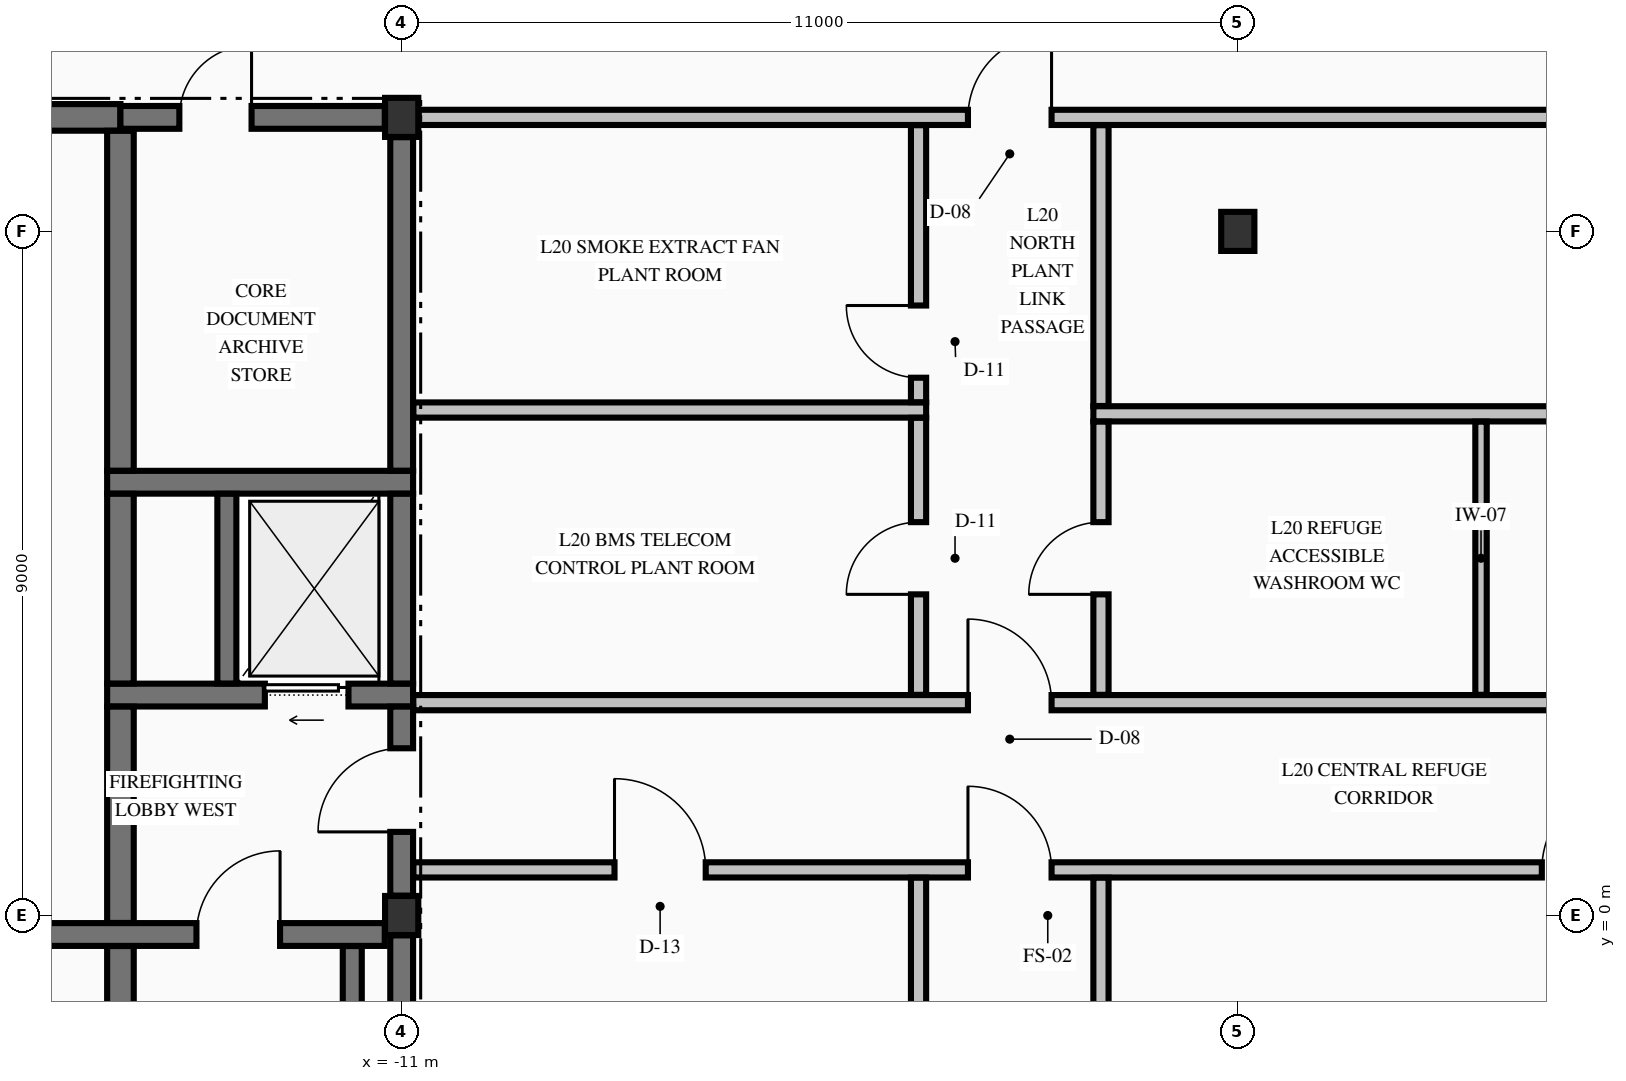
"""IFC4 building model, lengths in metres.
Left out: names, types, materials, properties, quantities, classifications, styles, units other than length and angle.
Written with IfcOpenShell. Run it as: python <this file> out.ifc"""

import sys

from ifc_helpers import new_model, si_unit, direction, frame, frame_2d, origin, origin_2d, place, context, subcontext, project, spatial, rectangle, i_section, extrude, element, fill, save


model = new_model("IFC4")
c1 = context("Model", 3, precision=1e-05, world=origin(), true_north=direction((0.0, 1.0)))
c2 = subcontext(c1, "Body", "Model", "MODEL_VIEW")
j1 = project(units=[si_unit("LENGTHUNIT", "METRE"), si_unit("PLANEANGLEUNIT", "RADIAN")], contexts=[c1])
p1 = place(None, origin())
s1 = spatial("IfcSite", under=j1, at=p1, CompositionType="ELEMENT")
p2 = place(p1, origin())
s2 = spatial("IfcBuilding", under=s1, at=p2, CompositionType="ELEMENT")
p3 = place(p2, frame((0.0, 0.0, 82.18)))
s3 = spatial("IfcBuildingStorey", under=s2, at=p3, CompositionType="ELEMENT", Elevation=82.18)
for number, where, z_axis, x_axis in (
    (1, (-11.0, 0.0, -0.425), (0.0, 0.0, 1.0), (1.0, 0.0, 0.0)),
    (2, (-11.0, 10.5, -0.425), (0.0, 0.0, 1.0), (1.0, 0.0, 0.0)),
    (3, (0.0, 9.0, -0.425), (0.0, 0.0, 1.0), (1.0, 0.0, 0.0)),
):
    element("IfcColumn", number, at=place(p3, frame(where, z_axis=z_axis, x_axis=x_axis)), inside=s3, PredefinedType="COLUMN", context=c2, shape_type="SweptSolid", body=[
        extrude(i_section(OverallWidth=0.437, OverallDepth=0.514, WebThickness=0.061, FlangeThickness=0.097, FilletRadius=0.015, at=origin_2d()), origin(), (0.0, 0.0, 1.0), 4.76),
    ])
p4 = place(p3, frame((-19.778, -0.25, 0.0), z_axis=(0.0, 0.0, 1.0), x_axis=(1.0, 0.0, 0.0)))
e4 = element("IfcWall", 4, at=p4, inside=s3, PredefinedType="SHEAR", context=c2, shape_type="SweptSolid", body=[
    extrude(rectangle(XDim=8.555, YDim=0.3, at=frame_2d((4.278, 0.0))), origin(), (0.0, 0.0, 1.0), 4.335),
])
p5 = place(p4, frame((6.077, 0.0, 0.0)))
e5 = element("IfcOpeningElement", 5, at=p5, cuts=e4, PredefinedType="OPENING", context=c2, shape_type="SweptSolid", body=[
    extrude(rectangle(XDim=1.1, YDim=2.15, at=frame_2d((0.55, 1.075))), frame((0.0, 0.16, 0.0), z_axis=(0.0, -1.0, 0.0), x_axis=(1.0, 0.0, 0.0)), (0.0, 0.0, 1.0), 0.32),
])
p6 = place(p3, frame((-14.875, 2.9, 0.0), z_axis=(0.0, 0.0, 1.0), x_axis=(1.0, 0.0, 0.0)))
e6 = element("IfcWall", 6, at=p6, inside=s3, PredefinedType="SHEAR", context=c2, shape_type="SweptSolid", body=[
    extrude(rectangle(XDim=4.025, YDim=0.3, at=frame_2d((2.012, 0.0))), origin(), (0.0, 0.0, 1.0), 4.335),
])
p7 = place(p6, frame((2.075, 0.0, 0.0)))
e7 = element("IfcOpeningElement", 7, at=p7, cuts=e6, PredefinedType="OPENING", context=c2, shape_type="SweptSolid", body=[
    extrude(rectangle(XDim=1.1, YDim=2.2, at=frame_2d((0.55, 1.1))), frame((0.0, 0.16, 0.0), z_axis=(0.0, -1.0, 0.0), x_axis=(1.0, 0.0, 0.0)), (0.0, 0.0, 1.0), 0.32),
])
p8 = place(p3, frame((-14.875, 5.7, 0.0), z_axis=(0.0, 0.0, 1.0), x_axis=(1.0, 0.0, 0.0)))
e8 = element("IfcWall", 8, at=p8, inside=s3, PredefinedType="SHEAR", context=c2, shape_type="SweptSolid", body=[
    extrude(rectangle(XDim=4.025, YDim=0.3, at=frame_2d((2.012, 0.0))), origin(), (0.0, 0.0, 1.0), 4.335),
])
p9 = place(p3, frame((-19.778, 10.5, 0.0), z_axis=(0.0, 0.0, 1.0), x_axis=(1.0, 0.0, 0.0)))
e9 = element("IfcWall", 9, at=p9, inside=s3, PredefinedType="SHEAR", context=c2, shape_type="SweptSolid", body=[
    extrude(rectangle(XDim=5.078, YDim=0.35, at=frame_2d((2.539, 0.0))), origin(), (0.0, 0.0, 1.0), 4.335),
])
p10 = place(p9, frame((1.903, 0.0, 0.0)))
e10 = element("IfcOpeningElement", 10, at=p10, cuts=e9, PredefinedType="OPENING", context=c2, shape_type="SweptSolid", body=[
    extrude(rectangle(XDim=0.95, YDim=2.02, at=frame_2d((0.475, 1.01))), frame((0.0, 0.185, 0.0), z_axis=(0.0, -1.0, 0.0), x_axis=(1.0, 0.0, 0.0)), (0.0, 0.0, 1.0), 0.37),
])
p11 = place(p3, frame((-14.7, 10.5, 0.0), z_axis=(0.0, 0.0, 1.0), x_axis=(1.0, 0.0, 0.0)))
e11 = element("IfcWall", 11, at=p11, inside=s3, PredefinedType="SHEAR", context=c2, shape_type="SweptSolid", body=[
    extrude(rectangle(XDim=3.478, YDim=0.3, at=frame_2d((1.739, 0.0))), origin(), (0.0, 0.0, 1.0), 4.335),
])
p12 = place(p11, frame((0.775, 0.0, 0.0)))
e12 = element("IfcOpeningElement", 12, at=p12, cuts=e11, PredefinedType="OPENING", context=c2, shape_type="SweptSolid", body=[
    extrude(rectangle(XDim=0.95, YDim=2.02, at=frame_2d((0.475, 1.01))), frame((0.0, 0.16, 0.0), z_axis=(0.0, -1.0, 0.0), x_axis=(1.0, 0.0, 0.0)), (0.0, 0.0, 1.0), 0.32),
])
p13 = place(p3, frame((-10.847, 0.6, 0.0), z_axis=(0.0, 0.0, 1.0), x_axis=(1.0, 0.0, 0.0)))
e13 = element("IfcWall", 13, at=p13, inside=s3, PredefinedType="PARTITIONING", context=c2, shape_type="SweptSolid", body=[
    extrude(rectangle(XDim=21.694, YDim=0.2, at=frame_2d((10.847, 0.0))), origin(), (0.0, 0.0, 1.0), 4.335),
])
p14 = place(p13, frame((7.297, 0.0, 0.0)))
e14 = element("IfcOpeningElement", 14, at=p14, cuts=e13, PredefinedType="OPENING", context=c2, shape_type="SweptSolid", body=[
    extrude(rectangle(XDim=1.1, YDim=2.15, at=frame_2d((0.55, 1.075))), frame((0.0, 0.11, 0.0), z_axis=(0.0, -1.0, 0.0), x_axis=(1.0, 0.0, 0.0)), (0.0, 0.0, 1.0), 0.22),
])
p15 = place(p13, frame((2.647, 0.0, 0.0)))
e15 = element("IfcOpeningElement", 15, at=p15, cuts=e13, PredefinedType="OPENING", context=c2, shape_type="SweptSolid", body=[
    extrude(rectangle(XDim=1.2, YDim=2.15, at=frame_2d((0.6, 1.075))), frame((0.0, 0.11, 0.0), z_axis=(0.0, -1.0, 0.0), x_axis=(1.0, 0.0, 0.0)), (0.0, 0.0, 1.0), 0.22),
])
p16 = place(p13, frame((14.847, 0.0, 0.0)))
e16 = element("IfcOpeningElement", 16, at=p16, cuts=e13, PredefinedType="OPENING", context=c2, shape_type="SweptSolid", body=[
    extrude(rectangle(XDim=1.2, YDim=2.15, at=frame_2d((0.6, 1.075))), frame((0.0, 0.11, 0.0), z_axis=(0.0, -1.0, 0.0), x_axis=(1.0, 0.0, 0.0)), (0.0, 0.0, 1.0), 0.22),
])
p17 = place(p3, frame((-10.847, 2.8, 0.0), z_axis=(0.0, 0.0, 1.0), x_axis=(1.0, 0.0, 0.0)))
e17 = element("IfcWall", 17, at=p17, inside=s3, PredefinedType="PARTITIONING", context=c2, shape_type="SweptSolid", body=[
    extrude(rectangle(XDim=21.694, YDim=0.2, at=frame_2d((10.847, 0.0))), origin(), (0.0, 0.0, 1.0), 4.335),
])
p18 = place(p17, frame((7.297, 0.0, 0.0)))
e18 = element("IfcOpeningElement", 18, at=p18, cuts=e17, PredefinedType="OPENING", context=c2, shape_type="SweptSolid", body=[
    extrude(rectangle(XDim=1.1, YDim=2.15, at=frame_2d((0.55, 1.075))), frame((0.0, 0.11, 0.0), z_axis=(0.0, -1.0, 0.0), x_axis=(1.0, 0.0, 0.0)), (0.0, 0.0, 1.0), 0.22),
])
p19 = place(p17, frame((17.497, 0.0, 0.0)))
e19 = element("IfcOpeningElement", 19, at=p19, cuts=e17, PredefinedType="OPENING", context=c2, shape_type="SweptSolid", body=[
    extrude(rectangle(XDim=1.1, YDim=2.15, at=frame_2d((0.55, 1.075))), frame((0.0, 0.11, 0.0), z_axis=(0.0, -1.0, 0.0), x_axis=(1.0, 0.0, 0.0)), (0.0, 0.0, 1.0), 0.22),
])
p20 = place(p3, frame((-1.9, 6.6, 0.0), z_axis=(0.0, 0.0, 1.0), x_axis=(1.0, 0.0, 0.0)))
e20 = element("IfcWall", 20, at=p20, inside=s3, PredefinedType="PARTITIONING", context=c2, shape_type="SweptSolid", body=[
    extrude(rectangle(XDim=12.747, YDim=0.2, at=frame_2d((6.374, 0.0))), origin(), (0.0, 0.0, 1.0), 4.335),
])
p21 = place(p3, frame((-10.847, 6.65, 0.0), z_axis=(0.0, 0.0, 1.0), x_axis=(1.0, 0.0, 0.0)))
e21 = element("IfcWall", 21, at=p21, inside=s3, PredefinedType="PARTITIONING", context=c2, shape_type="SweptSolid", body=[
    extrude(rectangle(XDim=6.747, YDim=0.2, at=frame_2d((3.374, 0.0))), origin(), (0.0, 0.0, 1.0), 4.335),
])
p22 = place(p3, frame((-10.775, 10.5, 0.0), z_axis=(0.0, 0.0, 1.0), x_axis=(1.0, 0.0, 0.0)))
e22 = element("IfcWall", 22, at=p22, inside=s3, PredefinedType="PARTITIONING", context=c2, shape_type="SweptSolid", body=[
    extrude(rectangle(XDim=21.551, YDim=0.2, at=frame_2d((10.775, 0.0))), origin(), (0.0, 0.0, 1.0), 4.335),
])
p23 = place(p22, frame((7.226, 0.0, 0.0)))
e23 = element("IfcOpeningElement", 23, at=p23, cuts=e22, PredefinedType="OPENING", context=c2, shape_type="SweptSolid", body=[
    extrude(rectangle(XDim=1.1, YDim=2.15, at=frame_2d((0.55, 1.075))), frame((0.0, 0.11, 0.0), z_axis=(0.0, -1.0, 0.0), x_axis=(1.0, 0.0, 0.0)), (0.0, 0.0, 1.0), 0.22),
])
p24 = place(p3, frame((-14.7, -9.773, 0.0), z_axis=(0.0, 0.0, 1.0), x_axis=(0.0, 1.0, 0.0)))
e24 = element("IfcWall", 24, at=p24, inside=s3, PredefinedType="SHEAR", context=c2, shape_type="SweptSolid", body=[
    extrude(rectangle(XDim=9.371, YDim=0.35, at=frame_2d((4.686, 0.0))), origin(), (0.0, 0.0, 1.0), 4.335),
])
p25 = place(p3, frame((-14.7, -0.098, 0.0), z_axis=(0.0, 0.0, 1.0), x_axis=(0.0, 1.0, 0.0)))
e25 = element("IfcWall", 25, at=p25, inside=s3, PredefinedType="SHEAR", context=c2, shape_type="SweptSolid", body=[
    extrude(rectangle(XDim=2.846, YDim=0.35, at=frame_2d((1.423, 0.0))), origin(), (0.0, 0.0, 1.0), 4.335),
])
p26 = place(p3, frame((-14.7, 3.052, 0.0), z_axis=(0.0, 0.0, 1.0), x_axis=(0.0, 1.0, 0.0)))
e26 = element("IfcWall", 26, at=p26, inside=s3, PredefinedType="SHEAR", context=c2, shape_type="SweptSolid", body=[
    extrude(rectangle(XDim=2.496, YDim=0.35, at=frame_2d((1.248, 0.0))), origin(), (0.0, 0.0, 1.0), 4.335),
])
p27 = place(p3, frame((-14.7, 5.852, 0.0), z_axis=(0.0, 0.0, 1.0), x_axis=(0.0, 1.0, 0.0)))
e27 = element("IfcWall", 27, at=p27, inside=s3, PredefinedType="SHEAR", context=c2, shape_type="SweptSolid", body=[
    extrude(rectangle(XDim=4.471, YDim=0.35, at=frame_2d((2.235, 0.0))), origin(), (0.0, 0.0, 1.0), 4.335),
])
p28 = place(p3, frame((-13.3, 3.052, 0.0), z_axis=(0.0, 0.0, 1.0), x_axis=(0.0, 1.0, 0.0)))
e28 = element("IfcWall", 28, at=p28, inside=s3, PredefinedType="SOLIDWALL", context=c2, shape_type="SweptSolid", body=[
    extrude(rectangle(XDim=2.496, YDim=0.25, at=frame_2d((1.248, 0.0))), origin(), (0.0, 0.0, 1.0), 4.335),
])
p29 = place(p3, frame((-11.65, -9.798, 0.0), z_axis=(0.0, 0.0, 1.0), x_axis=(0.0, 1.0, 0.0)))
e29 = element("IfcWall", 29, at=p29, inside=s3, PredefinedType="SOLIDWALL", context=c2, shape_type="SweptSolid", body=[
    extrude(rectangle(XDim=9.396, YDim=0.25, at=frame_2d((4.698, 0.0))), origin(), (0.0, 0.0, 1.0), 4.335),
])
p30 = place(p3, frame((-11.0, -9.689, 0.0), z_axis=(0.0, 0.0, 1.0), x_axis=(0.0, 1.0, 0.0)))
e30 = element("IfcWall", 30, at=p30, inside=s3, PredefinedType="SHEAR", context=c2, shape_type="SweptSolid", body=[
    extrude(rectangle(XDim=9.428, YDim=0.3, at=frame_2d((4.714, 0.0))), origin(), (0.0, 0.0, 1.0), 4.335),
])
p31 = place(p3, frame((-11.0, 0.261, 0.0), z_axis=(0.0, 0.0, 1.0), x_axis=(0.0, 1.0, 0.0)))
e31 = element("IfcWall", 31, at=p31, inside=s3, PredefinedType="SHEAR", context=c2, shape_type="SweptSolid", body=[
    extrude(rectangle(XDim=2.487, YDim=0.3, at=frame_2d((1.244, 0.0))), origin(), (0.0, 0.0, 1.0), 4.335),
])
p32 = place(p31, frame((0.839, 0.0, 0.0)))
e32 = element("IfcOpeningElement", 32, at=p32, cuts=e31, PredefinedType="OPENING", context=c2, shape_type="SweptSolid", body=[
    extrude(rectangle(XDim=1.1, YDim=2.15, at=frame_2d((0.55, 1.075))), frame((0.0, 0.16, 0.0), z_axis=(0.0, -1.0, 0.0), x_axis=(1.0, 0.0, 0.0)), (0.0, 0.0, 1.0), 0.32),
])
p33 = place(p3, frame((-11.0, 3.052, 0.0), z_axis=(0.0, 0.0, 1.0), x_axis=(0.0, 1.0, 0.0)))
e33 = element("IfcWall", 33, at=p33, inside=s3, PredefinedType="SHEAR", context=c2, shape_type="SweptSolid", body=[
    extrude(rectangle(XDim=2.496, YDim=0.3, at=frame_2d((1.248, 0.0))), origin(), (0.0, 0.0, 1.0), 4.335),
])
p34 = place(p3, frame((-11.0, 5.852, 0.0), z_axis=(0.0, 0.0, 1.0), x_axis=(0.0, 1.0, 0.0)))
e34 = element("IfcWall", 34, at=p34, inside=s3, PredefinedType="SHEAR", context=c2, shape_type="SweptSolid", body=[
    extrude(rectangle(XDim=4.387, YDim=0.3, at=frame_2d((2.193, 0.0))), origin(), (0.0, 0.0, 1.0), 4.335),
])
p35 = place(p3, frame((-4.2, -9.847, 0.0), z_axis=(0.0, 0.0, 1.0), x_axis=(0.0, 1.0, 0.0)))
e35 = element("IfcWall", 35, at=p35, inside=s3, PredefinedType="PARTITIONING", context=c2, shape_type="SweptSolid", body=[
    extrude(rectangle(XDim=10.344, YDim=0.2, at=frame_2d((5.172, 0.0))), origin(), (0.0, 0.0, 1.0), 4.335),
])
p36 = place(p3, frame((-4.2, 2.903, 0.0), z_axis=(0.0, 0.0, 1.0), x_axis=(0.0, 1.0, 0.0)))
e36 = element("IfcWall", 36, at=p36, inside=s3, PredefinedType="PARTITIONING", context=c2, shape_type="SweptSolid", body=[
    extrude(rectangle(XDim=3.644, YDim=0.2, at=frame_2d((1.822, 0.0))), origin(), (0.0, 0.0, 1.0), 4.335),
])
p37 = place(p36, frame((1.322, 0.0, 0.0)))
e37 = element("IfcOpeningElement", 37, at=p37, cuts=e36, PredefinedType="OPENING", context=c2, shape_type="SweptSolid", body=[
    extrude(rectangle(XDim=0.95, YDim=2.15, at=frame_2d((0.475, 1.075))), frame((0.0, 0.11, 0.0), z_axis=(0.0, -1.0, 0.0), x_axis=(1.0, 0.0, 0.0)), (0.0, 0.0, 1.0), 0.22),
])
p38 = place(p3, frame((-4.2, 6.753, 0.0), z_axis=(0.0, 0.0, 1.0), x_axis=(0.0, 1.0, 0.0)))
e38 = element("IfcWall", 38, at=p38, inside=s3, PredefinedType="PARTITIONING", context=c2, shape_type="SweptSolid", body=[
    extrude(rectangle(XDim=3.644, YDim=0.2, at=frame_2d((1.822, 0.0))), origin(), (0.0, 0.0, 1.0), 4.335),
])
p39 = place(p38, frame((0.322, 0.0, 0.0)))
e39 = element("IfcOpeningElement", 39, at=p39, cuts=e38, PredefinedType="OPENING", context=c2, shape_type="SweptSolid", body=[
    extrude(rectangle(XDim=0.95, YDim=2.15, at=frame_2d((0.475, 1.075))), frame((0.0, 0.11, 0.0), z_axis=(0.0, -1.0, 0.0), x_axis=(1.0, 0.0, 0.0)), (0.0, 0.0, 1.0), 0.22),
])
p40 = place(p3, frame((-1.8, -9.847, 0.0), z_axis=(0.0, 0.0, 1.0), x_axis=(0.0, 1.0, 0.0)))
e40 = element("IfcWall", 40, at=p40, inside=s3, PredefinedType="PARTITIONING", context=c2, shape_type="SweptSolid", body=[
    extrude(rectangle(XDim=10.344, YDim=0.2, at=frame_2d((5.172, 0.0))), origin(), (0.0, 0.0, 1.0), 4.335),
])
p41 = place(p3, frame((-1.8, 2.903, 0.0), z_axis=(0.0, 0.0, 1.0), x_axis=(0.0, 1.0, 0.0)))
e41 = element("IfcWall", 41, at=p41, inside=s3, PredefinedType="PARTITIONING", context=c2, shape_type="SweptSolid", body=[
    extrude(rectangle(XDim=3.594, YDim=0.2, at=frame_2d((1.797, 0.0))), origin(), (0.0, 0.0, 1.0), 4.335),
])
p42 = place(p41, frame((1.322, 0.0, 0.0)))
e42 = element("IfcOpeningElement", 42, at=p42, cuts=e41, PredefinedType="OPENING", context=c2, shape_type="SweptSolid", body=[
    extrude(rectangle(XDim=0.95, YDim=2.15, at=frame_2d((0.475, 1.075))), frame((0.0, 0.11, 0.0), z_axis=(0.0, -1.0, 0.0), x_axis=(1.0, 0.0, 0.0)), (0.0, 0.0, 1.0), 0.22),
])
p43 = place(p3, frame((-1.8, 6.703, 0.0), z_axis=(0.0, 0.0, 1.0), x_axis=(0.0, 1.0, 0.0)))
e43 = element("IfcWall", 43, at=p43, inside=s3, PredefinedType="PARTITIONING", context=c2, shape_type="SweptSolid", body=[
    extrude(rectangle(XDim=3.694, YDim=0.2, at=frame_2d((1.847, 0.0))), origin(), (0.0, 0.0, 1.0), 4.335),
])
p44 = place(p3, frame((3.2, 2.903, 0.0), z_axis=(0.0, 0.0, 1.0), x_axis=(0.0, 1.0, 0.0)))
e44 = element("IfcWall", 44, at=p44, inside=s3, PredefinedType="PARTITIONING", context=c2, shape_type="SweptSolid", body=[
    extrude(rectangle(XDim=3.594, YDim=0.15, at=frame_2d((1.797, 0.0))), origin(), (0.0, 0.0, 1.0), 4.335),
])
p45 = place(p5, origin())
e45 = element("IfcDoor", 45, at=p45, inside=s3, OperationType="SINGLE_SWING_RIGHT", PredefinedType="DOOR", context=c2, shape_type="SweptSolid", body=[
    extrude(rectangle(XDim=1.1, YDim=2.15, at=frame_2d((0.55, 1.075))), frame((0.0, 0.025, 0.0), z_axis=(0.0, -1.0, 0.0), x_axis=(1.0, 0.0, 0.0)), (0.0, 0.0, 1.0), 0.05),
])
fill(e5, e45)
p46 = place(p32, origin())
e46 = element("IfcDoor", 46, at=p46, inside=s3, OperationType="SINGLE_SWING_LEFT", PredefinedType="DOOR", context=c2, shape_type="SweptSolid", body=[
    extrude(rectangle(XDim=1.1, YDim=2.15, at=frame_2d((0.55, 1.075))), frame((0.0, 0.025, 0.0), z_axis=(0.0, -1.0, 0.0), x_axis=(1.0, 0.0, 0.0)), (0.0, 0.0, 1.0), 0.05),
])
fill(e32, e46)
p47 = place(p7, origin())
e47 = element("IfcDoor", 47, at=p47, inside=s3, OperationType="SLIDING_TO_LEFT", PredefinedType="DOOR", context=c2, shape_type="SweptSolid", body=[
    extrude(rectangle(XDim=1.1, YDim=2.2, at=frame_2d((0.55, 1.1))), frame((0.0, 0.025, 0.0), z_axis=(0.0, -1.0, 0.0), x_axis=(1.0, 0.0, 0.0)), (0.0, 0.0, 1.0), 0.05),
])
fill(e7, e47)
p48 = place(p12, origin())
e48 = element("IfcDoor", 48, at=p48, inside=s3, OperationType="SINGLE_SWING_RIGHT", PredefinedType="DOOR", context=c2, shape_type="SweptSolid", body=[
    extrude(rectangle(XDim=0.95, YDim=2.02, at=frame_2d((0.475, 1.01))), frame((0.0, 0.025, 0.0), z_axis=(0.0, -1.0, 0.0), x_axis=(1.0, 0.0, 0.0)), (0.0, 0.0, 1.0), 0.05),
])
fill(e12, e48)
p49 = place(p18, origin())
e49 = element("IfcDoor", 49, at=p49, inside=s3, OperationType="SINGLE_SWING_LEFT", PredefinedType="DOOR", context=c2, shape_type="SweptSolid", body=[
    extrude(rectangle(XDim=1.1, YDim=2.15, at=frame_2d((0.55, 1.075))), frame((0.0, 0.025, 0.0), z_axis=(0.0, -1.0, 0.0), x_axis=(1.0, 0.0, 0.0)), (0.0, 0.0, 1.0), 0.05),
])
fill(e18, e49)
p50 = place(p23, origin())
e50 = element("IfcDoor", 50, at=p50, inside=s3, OperationType="SINGLE_SWING_RIGHT", PredefinedType="DOOR", context=c2, shape_type="SweptSolid", body=[
    extrude(rectangle(XDim=1.1, YDim=2.15, at=frame_2d((0.55, 1.075))), frame((0.0, 0.025, 0.0), z_axis=(0.0, -1.0, 0.0), x_axis=(1.0, 0.0, 0.0)), (0.0, 0.0, 1.0), 0.05),
])
fill(e23, e50)
p51 = place(p14, origin())
e51 = element("IfcDoor", 51, at=p51, inside=s3, OperationType="SINGLE_SWING_LEFT", PredefinedType="DOOR", context=c2, shape_type="SweptSolid", body=[
    extrude(rectangle(XDim=1.1, YDim=2.15, at=frame_2d((0.55, 1.075))), frame((0.0, 0.025, 0.0), z_axis=(0.0, -1.0, 0.0), x_axis=(1.0, 0.0, 0.0)), (0.0, 0.0, 1.0), 0.05),
])
fill(e14, e51)
p52 = place(p15, origin())
e52 = element("IfcDoor", 52, at=p52, inside=s3, OperationType="SINGLE_SWING_LEFT", PredefinedType="DOOR", context=c2, shape_type="SweptSolid", body=[
    extrude(rectangle(XDim=1.2, YDim=2.15, at=frame_2d((0.6, 1.075))), frame((0.0, 0.025, 0.0), z_axis=(0.0, -1.0, 0.0), x_axis=(1.0, 0.0, 0.0)), (0.0, 0.0, 1.0), 0.05),
])
fill(e15, e52)
p53 = place(p16, origin())
e53 = element("IfcDoor", 53, at=p53, inside=s3, OperationType="SINGLE_SWING_RIGHT", PredefinedType="DOOR", context=c2, shape_type="SweptSolid", body=[
    extrude(rectangle(XDim=1.2, YDim=2.15, at=frame_2d((0.6, 1.075))), frame((0.0, 0.025, 0.0), z_axis=(0.0, -1.0, 0.0), x_axis=(1.0, 0.0, 0.0)), (0.0, 0.0, 1.0), 0.05),
])
fill(e16, e53)
p54 = place(p37, origin())
e54 = element("IfcDoor", 54, at=p54, inside=s3, OperationType="SINGLE_SWING_LEFT", PredefinedType="DOOR", context=c2, shape_type="SweptSolid", body=[
    extrude(rectangle(XDim=0.95, YDim=2.15, at=frame_2d((0.475, 1.075))), frame((0.0, 0.025, 0.0), z_axis=(0.0, -1.0, 0.0), x_axis=(1.0, 0.0, 0.0)), (0.0, 0.0, 1.0), 0.05),
])
fill(e37, e54)
p55 = place(p39, origin())
e55 = element("IfcDoor", 55, at=p55, inside=s3, OperationType="SINGLE_SWING_RIGHT", PredefinedType="DOOR", context=c2, shape_type="SweptSolid", body=[
    extrude(rectangle(XDim=0.95, YDim=2.15, at=frame_2d((0.475, 1.075))), frame((0.0, 0.025, 0.0), z_axis=(0.0, -1.0, 0.0), x_axis=(1.0, 0.0, 0.0)), (0.0, 0.0, 1.0), 0.05),
])
fill(e39, e55)
p56 = place(p42, origin())
e56 = element("IfcDoor", 56, at=p56, inside=s3, OperationType="SINGLE_SWING_LEFT", PredefinedType="DOOR", context=c2, shape_type="SweptSolid", body=[
    extrude(rectangle(XDim=0.95, YDim=2.15, at=frame_2d((0.475, 1.075))), frame((0.0, 0.025, 0.0), z_axis=(0.0, -1.0, 0.0), x_axis=(1.0, 0.0, 0.0)), (0.0, 0.0, 1.0), 0.05),
])
fill(e42, e56)
save(model, sys.argv[1])
